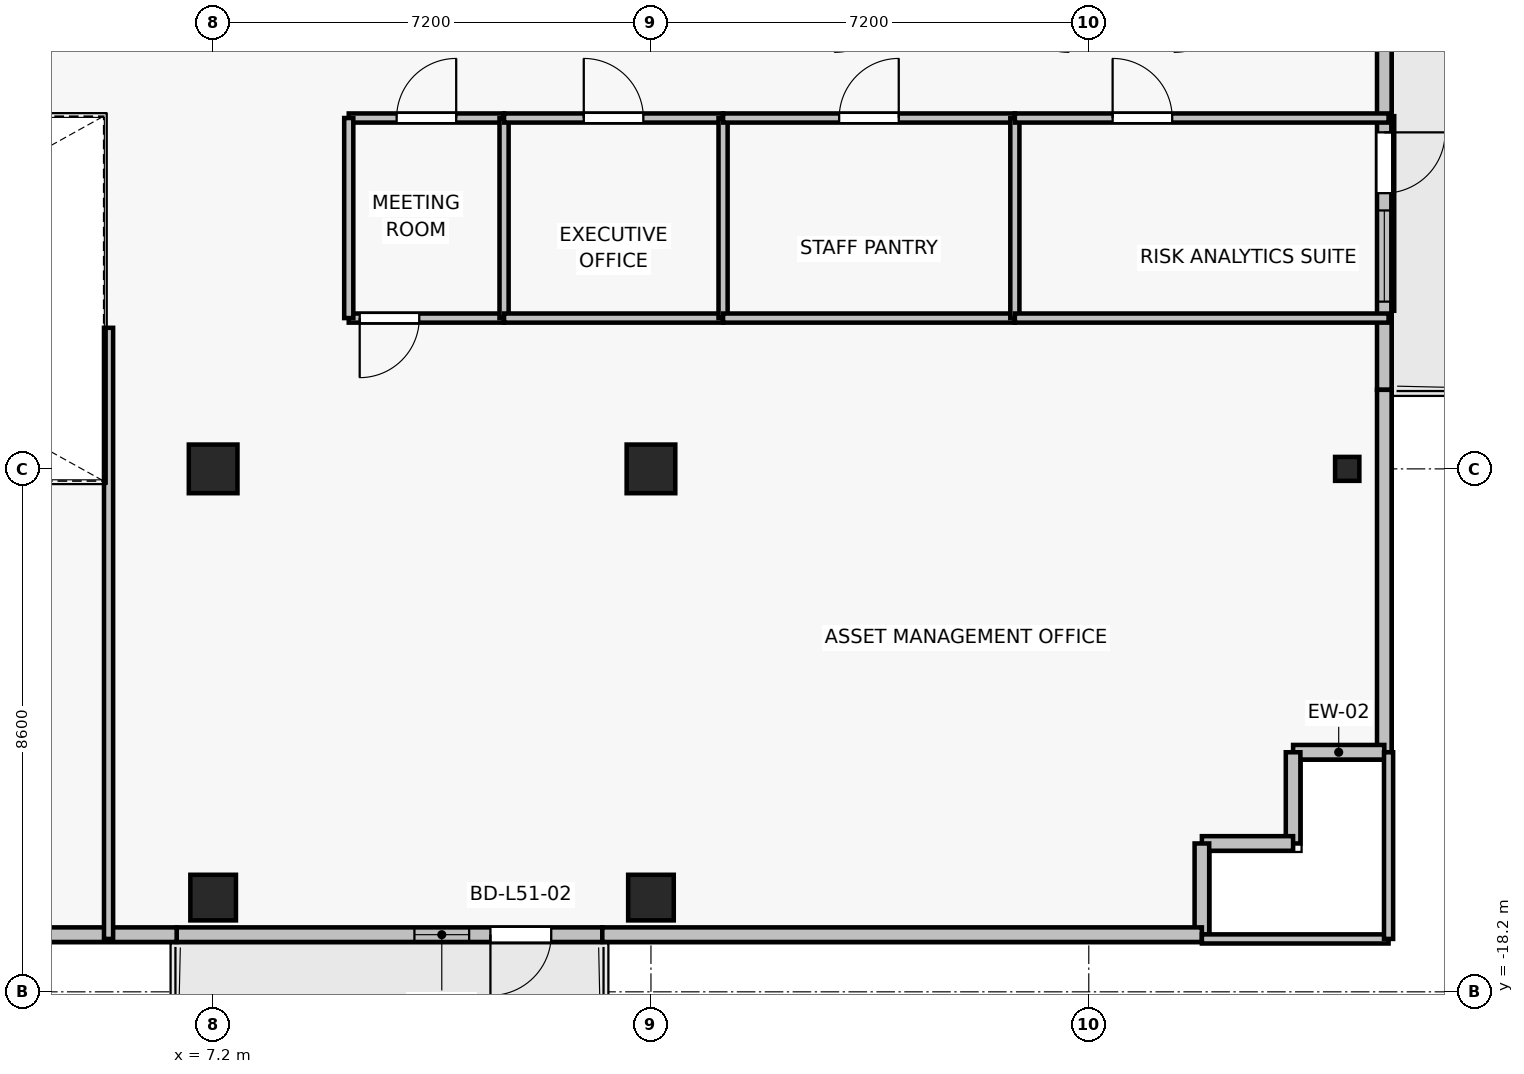
"""IFC4 building model, lengths in metres.
Left out: names, types, materials, properties, quantities, classifications, styles, units other than length and angle.
Written with IfcOpenShell. Run it as: python <this file> out.ifc"""

import sys

from ifc_helpers import new_model, si_unit, direction, frame, frame_2d, origin, origin_2d, place, context, subcontext, project, spatial, rectangle, i_section, extrude, source, transform, mapped, element, fill, save


model = new_model("IFC4")
c1 = context("Model", 3, precision=1e-05, world=origin(), true_north=direction((0.0, 1.0)))
c2 = subcontext(c1, "Body", "Model", "MODEL_VIEW")
j1 = project(units=[si_unit("LENGTHUNIT", "METRE"), si_unit("PLANEANGLEUNIT", "RADIAN")], contexts=[c1])
p1 = place(None, origin())
s1 = spatial("IfcSite", under=j1, at=p1, CompositionType="ELEMENT")
p2 = place(p1, origin())
s2 = spatial("IfcBuilding", under=s1, at=p2, CompositionType="ELEMENT")
p3 = place(p2, frame((0.0, 0.0, 182.5)))
s3 = spatial("IfcBuildingStorey", under=s2, at=p3, CompositionType="ELEMENT", Elevation=182.5)
for number, where, z_axis, x_axis in (
    (1, (7.2, -9.6, 0.0), (0.0, 0.0, 1.0), (1.0, 0.0, 0.0)),
    (2, (14.4, -9.6, 0.0), (0.0, 0.0, 1.0), (1.0, 0.0, 0.0)),
):
    element("IfcColumn", number, at=place(p3, frame(where, z_axis=z_axis, x_axis=x_axis)), inside=s3, PredefinedType="COLUMN", context=c2, shape_type="SweptSolid", body=[
        extrude(rectangle(XDim=0.8, YDim=0.8, at=origin_2d()), origin(), (0.0, 0.0, 1.0), 3.3),
    ])
for number, where, z_axis, x_axis in (
    (3, (7.2, -16.65, 0.0), (0.0, 0.0, 1.0), (1.0, 0.0, 0.0)),
    (4, (14.4, -16.65, 0.0), (0.0, 0.0, 1.0), (1.0, 0.0, 0.0)),
):
    element("IfcColumn", number, at=place(p3, frame(where, z_axis=z_axis, x_axis=x_axis)), inside=s3, PredefinedType="COLUMN", context=c2, shape_type="SweptSolid", body=[
        extrude(rectangle(XDim=0.75, YDim=0.75, at=origin_2d()), origin(), (0.0, 0.0, 1.0), 3.3),
    ])
p4 = place(p3, frame((25.85, -9.6, 0.0), z_axis=(0.0, 0.0, 1.0), x_axis=(1.0, 0.0, 0.0)))
e5 = element("IfcColumn", 5, at=p4, inside=s3, PredefinedType="COLUMN", context=c2, shape_type="SweptSolid", body=[
    extrude(i_section(OverallWidth=0.399, OverallDepth=0.394, WebThickness=0.023, FlangeThickness=0.037, FilletRadius=0.015, at=origin_2d()), origin(), (0.0, 0.0, 1.0), 3.3),
])
p5 = place(p3, frame((13.6, -17.26, 0.0), z_axis=(0.0, 0.0, 1.0), x_axis=(-1.0, 0.0, 0.0)))
e6 = element("IfcWall", 6, at=p5, inside=s3, PredefinedType="SOLIDWALL", context=c2, shape_type="SweptSolid", body=[
    extrude(rectangle(XDim=7.0, YDim=0.24, at=frame_2d((3.5, 0.0))), origin(), (0.0, 0.0, 1.0), 2.665),
])
p6 = place(p5, frame((0.84, 0.0, 0.0)))
e7 = element("IfcOpeningElement", 7, at=p6, cuts=e6, PredefinedType="OPENING", context=c2, shape_type="SweptSolid", body=[
    extrude(rectangle(XDim=1.0, YDim=2.2, at=frame_2d((0.5, 1.1))), frame((0.0, 0.13, 0.0), z_axis=(0.0, -1.0, 0.0), x_axis=(1.0, 0.0, 0.0)), (0.0, 0.0, 1.0), 0.26),
])
p7 = place(p5, frame((2.19, 0.0, 0.85)))
e8 = element("IfcOpeningElement", 8, at=p7, cuts=e6, PredefinedType="OPENING", context=c2, shape_type="SweptSolid", body=[
    extrude(rectangle(XDim=0.9, YDim=1.35, at=frame_2d((0.45, 0.675))), frame((0.0, 0.13, 0.0), z_axis=(0.0, -1.0, 0.0), x_axis=(1.0, 0.0, 0.0)), (0.0, 0.0, 1.0), 0.26),
])
p8 = place(p3, frame((26.46, -2.5, 0.0), z_axis=(0.0, 0.0, 1.0), x_axis=(0.0, -1.0, 0.0)))
e9 = element("IfcWall", 9, at=p8, inside=s3, PredefinedType="SOLIDWALL", context=c2, shape_type="SweptSolid", body=[
    extrude(rectangle(XDim=5.8, YDim=0.24, at=frame_2d((2.9, 0.0))), origin(), (0.0, 0.0, 1.0), 3.075),
])
p9 = place(p8, frame((1.566, 0.0, 0.0)))
e10 = element("IfcOpeningElement", 10, at=p9, cuts=e9, PredefinedType="OPENING", context=c2, shape_type="SweptSolid", body=[
    extrude(rectangle(XDim=1.0, YDim=2.2, at=frame_2d((0.5, 1.1))), frame((0.0, 0.13, 0.0), z_axis=(0.0, -1.0, 0.0), x_axis=(1.0, 0.0, 0.0)), (0.0, 0.0, 1.0), 0.26),
])
p10 = place(p8, frame((2.85, 0.0, 0.85)))
e11 = element("IfcOpeningElement", 11, at=p10, cuts=e9, PredefinedType="OPENING", context=c2, shape_type="SweptSolid", body=[
    extrude(rectangle(XDim=1.5, YDim=1.6, at=frame_2d((0.75, 0.8))), frame((0.0, 0.13, 0.0), z_axis=(0.0, -1.0, 0.0), x_axis=(1.0, 0.0, 0.0)), (0.0, 0.0, 1.0), 0.26),
])
p11 = place(p3, frame((26.46, -14.26, 0.0), z_axis=(0.0, 0.0, 1.0), x_axis=(0.0, 1.0, 0.0)))
e12 = element("IfcWall", 12, at=p11, inside=s3, PredefinedType="SOLIDWALL", context=c2, shape_type="SweptSolid", body=[
    extrude(rectangle(XDim=5.96, YDim=0.24, at=frame_2d((2.98, 0.0))), origin(), (0.0, 0.0, 1.0), 3.075),
])
for number, where, z_axis, x_axis in (
    (13, (24.96, -14.26, 0.0), (0.0, 0.0, 1.0), (1.0, 0.0, 0.0)),
    (14, (24.96, -15.76, 0.0), (0.0, 0.0, 1.0), (0.0, 1.0, 0.0)),
    (15, (23.46, -15.76, 0.0), (0.0, 0.0, 1.0), (1.0, 0.0, 0.0)),
    (16, (23.46, -17.26, 0.0), (0.0, 0.0, 1.0), (0.0, 1.0, 0.0)),
):
    element("IfcWall", number, at=place(p3, frame(where, z_axis=z_axis, x_axis=x_axis)), inside=s3, PredefinedType="SOLIDWALL", context=c2, shape_type="SweptSolid", body=[
        extrude(rectangle(XDim=1.5, YDim=0.24, at=frame_2d((0.75, 0.0))), origin(), (0.0, 0.0, 1.0), 3.075),
    ])
p12 = place(p3, frame((13.6, -17.26, 0.0), z_axis=(0.0, 0.0, 1.0), x_axis=(1.0, 0.0, 0.0)))
e17 = element("IfcWall", 17, at=p12, inside=s3, PredefinedType="SOLIDWALL", context=c2, shape_type="SweptSolid", body=[
    extrude(rectangle(XDim=9.86, YDim=0.24, at=frame_2d((4.93, 0.0))), origin(), (0.0, 0.0, 1.0), 2.665),
])
p13 = place(p3, frame((3.2, -17.26, 0.0), z_axis=(0.0, 0.0, 1.0), x_axis=(1.0, 0.0, 0.0)))
e18 = element("IfcWall", 18, at=p13, inside=s3, PredefinedType="SOLIDWALL", context=c2, shape_type="SweptSolid", body=[
    extrude(rectangle(XDim=3.4, YDim=0.24, at=frame_2d((1.7, 0.0))), origin(), (0.0, 0.0, 1.0), 3.075),
])
p14 = place(p3, frame((11.984, -7.12, 0.0), z_axis=(0.0, 0.0, 1.0), x_axis=(-1.0, 0.0, 0.0)))
e19 = element("IfcWall", 19, at=p14, inside=s3, PredefinedType="PARTITIONING", context=c2, shape_type="SweptSolid", body=[
    extrude(rectangle(XDim=2.554, YDim=0.15, at=frame_2d((1.277, 0.0))), origin(), (0.0, 0.0, 1.0), 3.075),
])
p15 = place(p14, frame((1.394, 0.0, 0.0)))
e20 = element("IfcOpeningElement", 20, at=p15, cuts=e19, PredefinedType="OPENING", context=c2, shape_type="SweptSolid", body=[
    extrude(rectangle(XDim=0.98, YDim=2.15, at=frame_2d((0.49, 1.075))), frame((0.0, 0.085, 0.0), z_axis=(0.0, -1.0, 0.0), x_axis=(1.0, 0.0, 0.0)), (0.0, 0.0, 1.0), 0.17),
])
p16 = place(p3, frame((9.43, -3.83, 0.0), z_axis=(0.0, 0.0, 1.0), x_axis=(1.0, 0.0, 0.0)))
e21 = element("IfcWall", 21, at=p16, inside=s3, PredefinedType="PARTITIONING", context=c2, shape_type="SweptSolid", body=[
    extrude(rectangle(XDim=2.554, YDim=0.15, at=frame_2d((1.277, 0.0))), origin(), (0.0, 0.0, 1.0), 3.075),
])
p17 = place(p16, frame((0.787, 0.0, 0.0)))
e22 = element("IfcOpeningElement", 22, at=p17, cuts=e21, PredefinedType="OPENING", context=c2, shape_type="SweptSolid", body=[
    extrude(rectangle(XDim=0.98, YDim=2.15, at=frame_2d((0.49, 1.075))), frame((0.0, 0.085, 0.0), z_axis=(0.0, -1.0, 0.0), x_axis=(1.0, 0.0, 0.0)), (0.0, 0.0, 1.0), 0.17),
])
for number, where, z_axis, x_axis in (
    (23, (9.43, -7.12, 0.0), (0.0, 0.0, 1.0), (0.0, 1.0, 0.0)),
    (24, (11.984, -3.83, 0.0), (0.0, 0.0, 1.0), (0.0, -1.0, 0.0)),
):
    element("IfcWall", number, at=place(p3, frame(where, z_axis=z_axis, x_axis=x_axis)), inside=s3, PredefinedType="PARTITIONING", context=c2, shape_type="SweptSolid", body=[
        extrude(rectangle(XDim=3.29, YDim=0.15, at=frame_2d((1.645, 0.0))), origin(), (0.0, 0.0, 1.0), 2.665),
    ])
p18 = place(p3, frame((15.586, -7.12, 0.0), z_axis=(0.0, 0.0, 1.0), x_axis=(-1.0, 0.0, 0.0)))
e25 = element("IfcWall", 25, at=p18, inside=s3, PredefinedType="PARTITIONING", context=c2, shape_type="SweptSolid", body=[
    extrude(rectangle(XDim=3.602, YDim=0.15, at=frame_2d((1.801, 0.0))), origin(), (0.0, 0.0, 1.0), 2.565),
])
p19 = place(p3, frame((11.984, -3.83, 0.0), z_axis=(0.0, 0.0, 1.0), x_axis=(1.0, 0.0, 0.0)))
e26 = element("IfcWall", 26, at=p19, inside=s3, PredefinedType="PARTITIONING", context=c2, shape_type="SweptSolid", body=[
    extrude(rectangle(XDim=3.602, YDim=0.15, at=frame_2d((1.801, 0.0))), origin(), (0.0, 0.0, 1.0), 2.565),
])
p20 = place(p19, frame((1.311, 0.0, 0.0)))
e27 = element("IfcOpeningElement", 27, at=p20, cuts=e26, PredefinedType="OPENING", context=c2, shape_type="SweptSolid", body=[
    extrude(rectangle(XDim=0.98, YDim=2.15, at=frame_2d((0.49, 1.075))), frame((0.0, 0.085, 0.0), z_axis=(0.0, -1.0, 0.0), x_axis=(1.0, 0.0, 0.0)), (0.0, 0.0, 1.0), 0.17),
])
p21 = place(p3, frame((15.586, -3.83, 0.0), z_axis=(0.0, 0.0, 1.0), x_axis=(0.0, -1.0, 0.0)))
e28 = element("IfcWall", 28, at=p21, inside=s3, PredefinedType="PARTITIONING", context=c2, shape_type="SweptSolid", body=[
    extrude(rectangle(XDim=3.29, YDim=0.15, at=frame_2d((1.645, 0.0))), origin(), (0.0, 0.0, 1.0), 3.075),
])
p22 = place(p3, frame((20.385, -7.12, 0.0), z_axis=(0.0, 0.0, 1.0), x_axis=(-1.0, 0.0, 0.0)))
e29 = element("IfcWall", 29, at=p22, inside=s3, PredefinedType="PARTITIONING", context=c2, shape_type="SweptSolid", body=[
    extrude(rectangle(XDim=4.799, YDim=0.15, at=frame_2d((2.399, 0.0))), origin(), (0.0, 0.0, 1.0), 3.075),
])
p23 = place(p3, frame((15.586, -3.83, 0.0), z_axis=(0.0, 0.0, 1.0), x_axis=(1.0, 0.0, 0.0)))
e30 = element("IfcWall", 30, at=p23, inside=s3, PredefinedType="PARTITIONING", context=c2, shape_type="SweptSolid", body=[
    extrude(rectangle(XDim=4.799, YDim=0.15, at=frame_2d((2.399, 0.0))), origin(), (0.0, 0.0, 1.0), 3.075),
])
p24 = place(p23, frame((1.909, 0.0, 0.0)))
e31 = element("IfcOpeningElement", 31, at=p24, cuts=e30, PredefinedType="OPENING", context=c2, shape_type="SweptSolid", body=[
    extrude(rectangle(XDim=0.98, YDim=2.15, at=frame_2d((0.49, 1.075))), frame((0.0, 0.085, 0.0), z_axis=(0.0, -1.0, 0.0), x_axis=(1.0, 0.0, 0.0)), (0.0, 0.0, 1.0), 0.17),
])
p25 = place(p3, frame((20.385, -3.83, 0.0), z_axis=(0.0, 0.0, 1.0), x_axis=(0.0, -1.0, 0.0)))
e32 = element("IfcWall", 32, at=p25, inside=s3, PredefinedType="PARTITIONING", context=c2, shape_type="SweptSolid", body=[
    extrude(rectangle(XDim=3.29, YDim=0.15, at=frame_2d((1.645, 0.0))), origin(), (0.0, 0.0, 1.0), 3.075),
])
p26 = place(p3, frame((26.53, -7.12, 0.0), z_axis=(0.0, 0.0, 1.0), x_axis=(-1.0, 0.0, 0.0)))
e33 = element("IfcWall", 33, at=p26, inside=s3, PredefinedType="PARTITIONING", context=c2, shape_type="SweptSolid", body=[
    extrude(rectangle(XDim=6.146, YDim=0.15, at=frame_2d((3.073, 0.0))), origin(), (0.0, 0.0, 1.0), 2.565),
])
p27 = place(p3, frame((20.385, -3.83, 0.0), z_axis=(0.0, 0.0, 1.0), x_axis=(1.0, 0.0, 0.0)))
e34 = element("IfcWall", 34, at=p27, inside=s3, PredefinedType="PARTITIONING", context=c2, shape_type="SweptSolid", body=[
    extrude(rectangle(XDim=6.146, YDim=0.15, at=frame_2d((3.073, 0.0))), origin(), (0.0, 0.0, 1.0), 2.565),
])
p28 = place(p27, frame((1.607, 0.0, 0.0)))
e35 = element("IfcOpeningElement", 35, at=p28, cuts=e34, PredefinedType="OPENING", context=c2, shape_type="SweptSolid", body=[
    extrude(rectangle(XDim=0.98, YDim=2.15, at=frame_2d((0.49, 1.075))), frame((0.0, 0.085, 0.0), z_axis=(0.0, -1.0, 0.0), x_axis=(1.0, 0.0, 0.0)), (0.0, 0.0, 1.0), 0.17),
])
p29 = place(p3, frame((26.53, -17.33, 0.0), z_axis=(0.0, 0.0, 1.0), x_axis=(-1.0, 0.0, 0.0)))
e36 = element("IfcWall", 36, at=p29, inside=s3, PredefinedType="PARTITIONING", context=c2, shape_type="SweptSolid", body=[
    extrude(rectangle(XDim=3.07, YDim=0.15, at=frame_2d((1.535, 0.0))), origin(), (0.0, 0.0, 1.0), 2.665),
])
p30 = place(p3, frame((5.48, -17.33, 0.0), z_axis=(0.0, 0.0, 1.0), x_axis=(0.0, 1.0, 0.0)))
e37 = element("IfcWall", 37, at=p30, inside=s3, PredefinedType="PARTITIONING", context=c2, shape_type="SweptSolid", body=[
    extrude(rectangle(XDim=10.05, YDim=0.15, at=frame_2d((5.025, 0.0))), origin(), (0.0, 0.0, 1.0), 2.565),
])
p31 = place(p3, frame((26.53, -14.26, 0.0), z_axis=(0.0, 0.0, 1.0), x_axis=(0.0, -1.0, 0.0)))
e38 = element("IfcWall", 38, at=p31, inside=s3, PredefinedType="PARTITIONING", context=c2, shape_type="SweptSolid", body=[
    extrude(rectangle(XDim=3.07, YDim=0.15, at=frame_2d((1.535, 0.0))), origin(), (0.0, 0.0, 1.0), 3.075),
])
m1 = source(origin(), c2, "Body", "SweptSolid", [
    extrude(rectangle(XDim=1.0, YDim=2.2, at=frame_2d((0.5, 1.1))), frame((0.0, 0.025, 0.0), z_axis=(0.0, -1.0, 0.0), x_axis=(1.0, 0.0, 0.0)), (0.0, 0.0, 1.0), 0.05),
])
p32 = place(p6, origin())
e39 = element("IfcDoor", 39, at=p32, inside=s3, OperationType="SINGLE_SWING_RIGHT", PredefinedType="DOOR", context=c2, shape_type="MappedRepresentation", body=[
    mapped(m1, transform((0.0, 0.0, 0.0), x_axis=(1.0, 0.0, 0.0), y_axis=(0.0, 1.0, 0.0), z_axis=(0.0, 0.0, 1.0), scale=1.0)),
])
fill(e7, e39)
m2 = source(origin(), c2, "Body", "SweptSolid", [
    extrude(rectangle(XDim=0.9, YDim=1.35, at=frame_2d((0.45, 0.675))), frame((0.0, 0.03, 0.0), z_axis=(0.0, -1.0, 0.0), x_axis=(1.0, 0.0, 0.0)), (0.0, 0.0, 1.0), 0.06),
])
p33 = place(p7, origin())
e40 = element("IfcWindow", 40, at=p33, inside=s3, PartitioningType="SINGLE_PANEL", PredefinedType="WINDOW", context=c2, shape_type="MappedRepresentation", body=[
    mapped(m2, transform((0.0, 0.0, 0.0), x_axis=(1.0, 0.0, 0.0), y_axis=(0.0, 1.0, 0.0), z_axis=(0.0, 0.0, 1.0), scale=1.0)),
])
fill(e8, e40)
p34 = place(p9, origin())
e41 = element("IfcDoor", 41, at=p34, inside=s3, OperationType="SINGLE_SWING_LEFT", PredefinedType="DOOR", context=c2, shape_type="MappedRepresentation", body=[
    mapped(m1, transform((0.0, 0.0, 0.0), x_axis=(1.0, 0.0, 0.0), y_axis=(0.0, 1.0, 0.0), z_axis=(0.0, 0.0, 1.0), scale=1.0)),
])
fill(e10, e41)
m3 = source(origin(), c2, "Body", "SweptSolid", [
    extrude(rectangle(XDim=1.5, YDim=1.6, at=frame_2d((0.75, 0.8))), frame((0.0, 0.03, 0.0), z_axis=(0.0, -1.0, 0.0), x_axis=(1.0, 0.0, 0.0)), (0.0, 0.0, 1.0), 0.06),
])
p35 = place(p10, origin())
e42 = element("IfcWindow", 42, at=p35, inside=s3, PartitioningType="SINGLE_PANEL", PredefinedType="WINDOW", context=c2, shape_type="MappedRepresentation", body=[
    mapped(m3, transform((0.0, 0.0, 0.0), x_axis=(1.0, 0.0, 0.0), y_axis=(0.0, 1.0, 0.0), z_axis=(0.0, 0.0, 1.0), scale=1.0)),
])
fill(e11, e42)
m4 = source(origin(), c2, "Body", "SweptSolid", [
    extrude(rectangle(XDim=0.98, YDim=2.15, at=frame_2d((0.49, 1.075))), frame((0.0, 0.025, 0.0), z_axis=(0.0, -1.0, 0.0), x_axis=(1.0, 0.0, 0.0)), (0.0, 0.0, 1.0), 0.05),
])
p36 = place(p17, origin())
e43 = element("IfcDoor", 43, at=p36, inside=s3, OperationType="SINGLE_SWING_RIGHT", PredefinedType="DOOR", context=c2, shape_type="MappedRepresentation", body=[
    mapped(m4, transform((0.0, 0.0, 0.0), x_axis=(1.0, 0.0, 0.0), y_axis=(0.0, 1.0, 0.0), z_axis=(0.0, 0.0, 1.0), scale=1.0)),
])
fill(e22, e43)
p37 = place(p20, origin())
e44 = element("IfcDoor", 44, at=p37, inside=s3, OperationType="SINGLE_SWING_LEFT", PredefinedType="DOOR", context=c2, shape_type="MappedRepresentation", body=[
    mapped(m4, transform((0.0, 0.0, 0.0), x_axis=(1.0, 0.0, 0.0), y_axis=(0.0, 1.0, 0.0), z_axis=(0.0, 0.0, 1.0), scale=1.0)),
])
fill(e27, e44)
p38 = place(p24, origin())
e45 = element("IfcDoor", 45, at=p38, inside=s3, OperationType="SINGLE_SWING_RIGHT", PredefinedType="DOOR", context=c2, shape_type="MappedRepresentation", body=[
    mapped(m4, transform((0.0, 0.0, 0.0), x_axis=(1.0, 0.0, 0.0), y_axis=(0.0, 1.0, 0.0), z_axis=(0.0, 0.0, 1.0), scale=1.0)),
])
fill(e31, e45)
p39 = place(p28, origin())
e46 = element("IfcDoor", 46, at=p39, inside=s3, OperationType="SINGLE_SWING_LEFT", PredefinedType="DOOR", context=c2, shape_type="MappedRepresentation", body=[
    mapped(m4, transform((0.0, 0.0, 0.0), x_axis=(1.0, 0.0, 0.0), y_axis=(0.0, 1.0, 0.0), z_axis=(0.0, 0.0, 1.0), scale=1.0)),
])
fill(e35, e46)
p40 = place(p15, origin())
e47 = element("IfcDoor", 47, at=p40, inside=s3, OperationType="SINGLE_SWING_RIGHT", PredefinedType="DOOR", context=c2, shape_type="MappedRepresentation", body=[
    mapped(m4, transform((0.0, 0.0, 0.0), x_axis=(1.0, 0.0, 0.0), y_axis=(0.0, 1.0, 0.0), z_axis=(0.0, 0.0, 1.0), scale=1.0)),
])
fill(e20, e47)
save(model, sys.argv[1])
